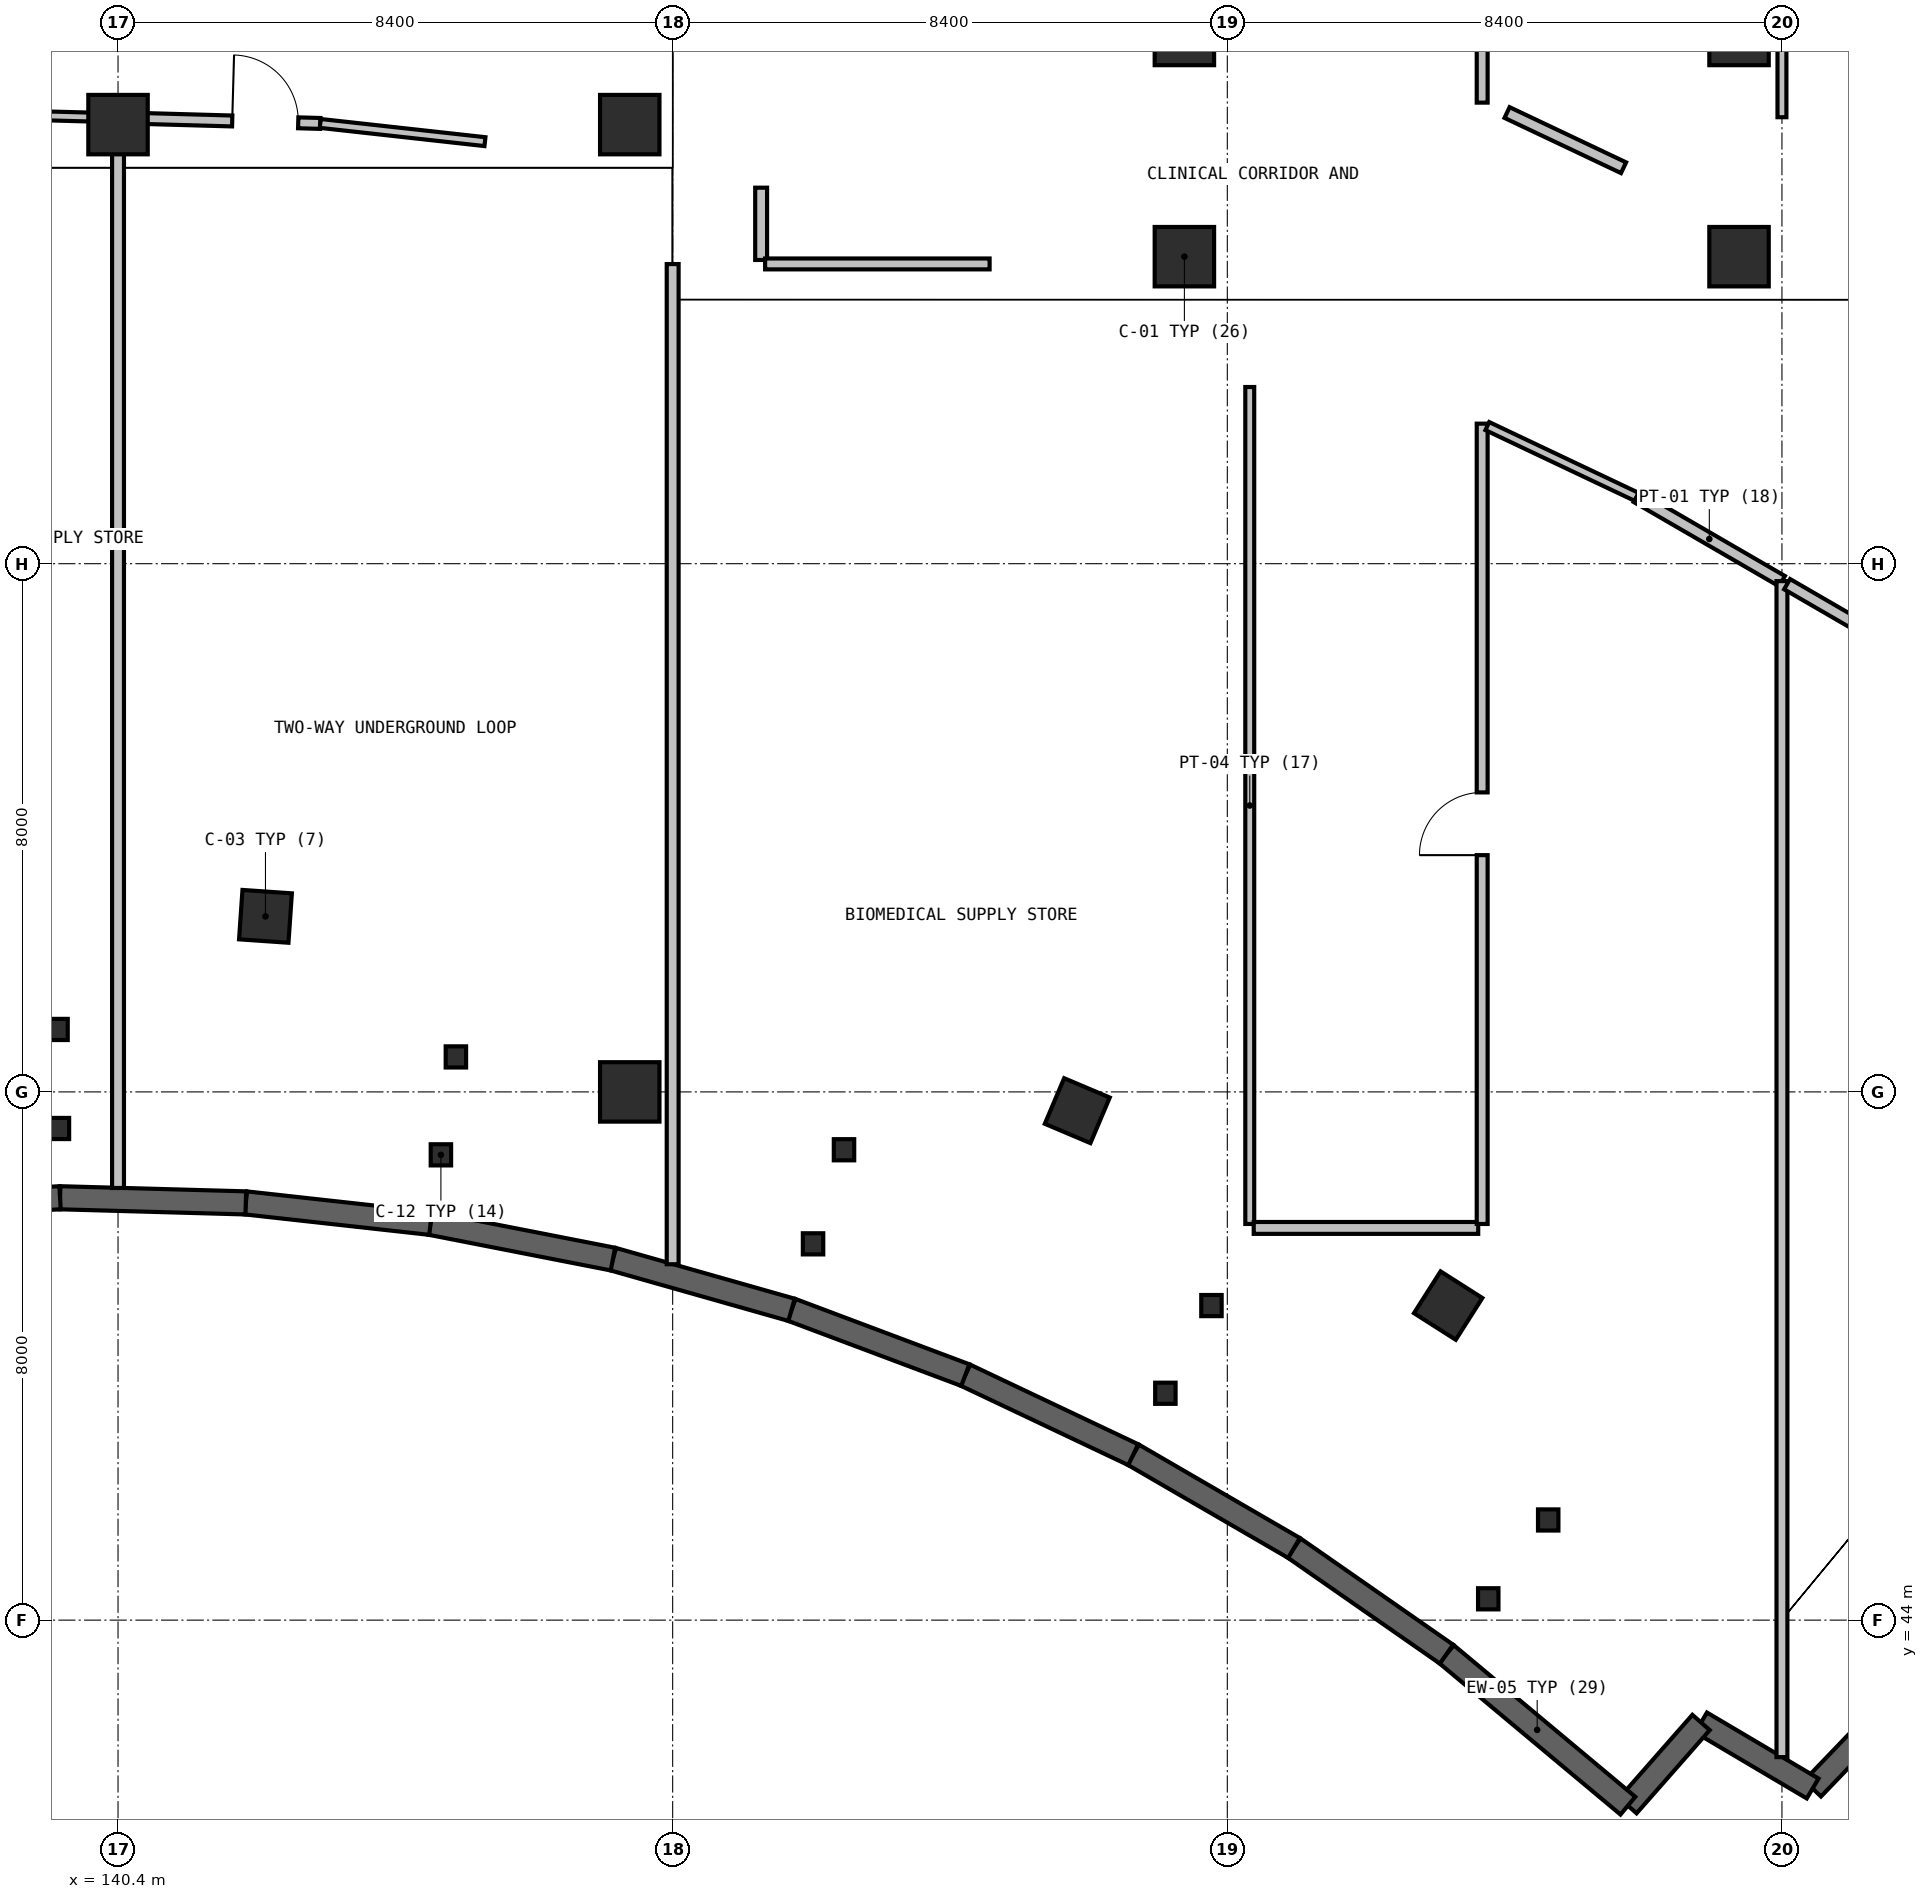
"""IFC4 building model, lengths in metres.
Left out: names, types, materials, properties, quantities, classifications, styles, units other than length and angle.
Written with IfcOpenShell. Run it as: python <this file> out.ifc"""

import sys

from ifc_helpers import new_model, si_unit, direction, frame, frame_2d, origin, origin_2d, place, context, subcontext, project, spatial, rectangle, i_section, extrude, element, fill, save


model = new_model("IFC4")
c1 = context("Model", 3, precision=1e-05, world=origin(), true_north=direction((0.0, 1.0)))
c2 = subcontext(c1, "Body", "Model", "MODEL_VIEW")
j1 = project(units=[si_unit("LENGTHUNIT", "METRE"), si_unit("PLANEANGLEUNIT", "RADIAN")], contexts=[c1])
p1 = place(None, origin())
s1 = spatial("IfcSite", under=j1, at=p1, CompositionType="ELEMENT")
p2 = place(p1, origin())
s2 = spatial("IfcBuilding", under=s1, at=p2, CompositionType="ELEMENT")
p3 = place(p2, frame((0.0, 0.0, -4.8)))
s3 = spatial("IfcBuildingStorey", under=s2, at=p3, CompositionType="ELEMENT", Elevation=-4.8)
for number, where, z_axis, x_axis in (
    (1, (139.484, 52.946, 0.0), (0.0, 0.0, 1.0), (1.0, 0.0, 0.0)),
    (2, (139.505, 51.446, 0.0), (0.0, 0.0, 1.0), (1.0, 0.0, 0.0)),
    (3, (145.517, 52.53, 0.0), (0.0, 0.0, 1.0), (1.0, 0.0, 0.0)),
    (4, (145.29, 51.047, 0.0), (0.0, 0.0, 1.0), (1.0, 0.0, 0.0)),
    (5, (151.395, 51.124, 0.0), (0.0, 0.0, 1.0), (1.0, 0.0, 0.0)),
    (6, (150.926, 49.699, 0.0), (0.0, 0.0, 1.0), (1.0, 0.0, 0.0)),
    (7, (156.96, 48.764, 0.0), (0.0, 0.0, 1.0), (1.0, 0.0, 0.0)),
    (8, (156.262, 47.436, 0.0), (0.0, 0.0, 1.0), (1.0, 0.0, 0.0)),
    (9, (162.06, 45.517, 0.0), (0.0, 0.0, 1.0), (1.0, 0.0, 0.0)),
    (10, (161.152, 44.323, 0.0), (0.0, 0.0, 1.0), (1.0, 0.0, 0.0)),
):
    element("IfcColumn", number, at=place(p3, frame(where, z_axis=z_axis, x_axis=x_axis)), inside=s3, PredefinedType="COLUMN", context=c2, shape_type="SweptSolid", body=[
        extrude(i_section(OverallWidth=0.309, OverallDepth=0.321, WebThickness=0.014, FlangeThickness=0.022, at=origin_2d()), origin(), (0.0, 0.0, 1.0), 4.8),
    ])
p4 = place(p3, frame((140.4, 66.65, 0.0), z_axis=(0.0, 0.0, 1.0), x_axis=(1.0, 0.0, 0.0)))
e11 = element("IfcColumn", 11, at=p4, inside=s3, PredefinedType="COLUMN", context=c2, shape_type="SweptSolid", body=[
    extrude(rectangle(XDim=0.9, YDim=0.9, at=origin_2d()), origin(), (0.0, 0.0, 1.0), 4.8),
])
p5 = place(p3, frame((148.15, 52.0, 0.0), z_axis=(0.0, 0.0, 1.0), x_axis=(1.0, 0.0, 0.0)))
e12 = element("IfcColumn", 12, at=p5, inside=s3, PredefinedType="COLUMN", context=c2, shape_type="SweptSolid", body=[
    extrude(rectangle(XDim=0.9, YDim=0.9, at=origin_2d()), origin(), (0.0, 0.0, 1.0), 4.565),
])
for number, where, z_axis, x_axis in (
    (13, (148.15, 66.65, 0.0), (0.0, 0.0, 1.0), (1.0, 0.0, 0.0)),
    (14, (156.55, 64.65, 0.0), (0.0, 0.0, 1.0), (1.0, 0.0, 0.0)),
    (15, (156.55, 68.0, 0.0), (0.0, 0.0, 1.0), (1.0, 0.0, 0.0)),
    (16, (164.95, 64.65, 0.0), (0.0, 0.0, 1.0), (1.0, 0.0, 0.0)),
    (17, (164.95, 68.0, 0.0), (0.0, 0.0, 1.0), (1.0, 0.0, 0.0)),
):
    element("IfcColumn", number, at=place(p3, frame(where, z_axis=z_axis, x_axis=x_axis)), inside=s3, PredefinedType="COLUMN", context=c2, shape_type="SweptSolid", body=[
        extrude(rectangle(XDim=0.9, YDim=0.9, at=origin_2d()), origin(), (0.0, 0.0, 1.0), 4.8),
    ])
for number, where, z_axis, x_axis in (
    (18, (142.633, 54.659, 0.0), (0.0, 0.0, 1.0), (0.069, 0.998, 0.0)),
    (19, (154.928, 51.716, 0.0), (0.0, 0.0, 1.0), (0.39, 0.921, 0.0)),
    (20, (160.545, 48.764, 0.0), (0.0, 0.0, 1.0), (0.537, 0.844, 0.0)),
):
    element("IfcColumn", number, at=place(p3, frame(where, z_axis=z_axis, x_axis=x_axis)), inside=s3, PredefinedType="COLUMN", context=c2, shape_type="SweptSolid", body=[
        extrude(rectangle(XDim=0.75, YDim=0.75, at=origin_2d()), origin(), (0.0, 0.0, 1.0), 4.8),
    ])
p6 = place(p3, frame((168.79, 44.285, 0.0), z_axis=(0.0, 0.0, 1.0), x_axis=(-0.692999521626, -0.72093804382, 0.0)))
e21 = element("IfcWall", 21, at=p6, inside=s3, PredefinedType="SHEAR", context=c2, shape_type="SweptSolid", body=[
    extrude(rectangle(XDim=3.932, YDim=0.35, at=frame_2d((1.966, 0.0))), origin(), (0.0, 0.0, 1.0), 4.45),
])
p7 = place(p3, frame((166.065, 41.45, 0.0), z_axis=(0.0, 0.0, 1.0), x_axis=(-0.860614493438, 0.509257001606, 0.0)))
e22 = element("IfcWall", 22, at=p7, inside=s3, PredefinedType="SHEAR", context=c2, shape_type="SweptSolid", body=[
    extrude(rectangle(XDim=1.964, YDim=0.35, at=frame_2d((0.982, 0.0))), origin(), (0.0, 0.0, 1.0), 4.45),
])
p8 = place(p3, frame((164.375, 42.45, 0.0), z_axis=(0.0, 0.0, 1.0), x_axis=(-0.660326061666, -0.750979022533, 0.0)))
e23 = element("IfcWall", 23, at=p8, inside=s3, PredefinedType="SHEAR", context=c2, shape_type="SweptSolid", body=[
    extrude(rectangle(XDim=1.678, YDim=0.35, at=frame_2d((0.839, 0.0))), origin(), (0.0, 0.0, 1.0), 4.45),
])
p9 = place(p3, frame((163.267, 41.19, 0.0), z_axis=(0.0, 0.0, 1.0), x_axis=(-0.767516584988, 0.641029088083, 0.0)))
e24 = element("IfcWall", 24, at=p9, inside=s3, PredefinedType="SHEAR", context=c2, shape_type="SweptSolid", body=[
    extrude(rectangle(XDim=3.58, YDim=0.35, at=frame_2d((1.79, 0.0))), origin(), (0.0, 0.0, 1.0), 4.45),
])
p10 = place(p3, frame((160.519, 43.485, 0.0), z_axis=(0.0, 0.0, 1.0), x_axis=(-0.820639839103, 0.571445758123, 0.0)))
e25 = element("IfcWall", 25, at=p10, inside=s3, PredefinedType="SHEAR", context=c2, shape_type="SweptSolid", body=[
    extrude(rectangle(XDim=2.814, YDim=0.35, at=frame_2d((1.407, 0.0))), origin(), (0.0, 0.0, 1.0), 4.45),
])
p11 = place(p3, frame((158.21, 45.093, 0.0), z_axis=(0.0, 0.0, 1.0), x_axis=(-0.864915249361, 0.501917932956, 0.0)))
e26 = element("IfcWall", 26, at=p11, inside=s3, PredefinedType="SHEAR", context=c2, shape_type="SweptSolid", body=[
    extrude(rectangle(XDim=2.815, YDim=0.35, at=frame_2d((1.408, 0.0))), origin(), (0.0, 0.0, 1.0), 4.45),
])
p12 = place(p3, frame((155.775, 46.506, 0.0), z_axis=(0.0, 0.0, 1.0), x_axis=(-0.903700736415, 0.428164663422, 0.0)))
e27 = element("IfcWall", 27, at=p12, inside=s3, PredefinedType="SHEAR", context=c2, shape_type="SweptSolid", body=[
    extrude(rectangle(XDim=2.814, YDim=0.35, at=frame_2d((1.407, 0.0))), origin(), (0.0, 0.0, 1.0), 4.45),
])
p13 = place(p3, frame((153.232, 47.711, 0.0), z_axis=(0.0, 0.0, 1.0), x_axis=(-0.936086290475, 0.351770460363, 0.0)))
e28 = element("IfcWall", 28, at=p13, inside=s3, PredefinedType="SHEAR", context=c2, shape_type="SweptSolid", body=[
    extrude(rectangle(XDim=2.812, YDim=0.35, at=frame_2d((1.406, 0.0))), origin(), (0.0, 0.0, 1.0), 4.45),
])
p14 = place(p3, frame((150.6, 48.7, 0.0), z_axis=(0.0, 0.0, 1.0), x_axis=(-0.961974769047, 0.273138323414, 0.0)))
e29 = element("IfcWall", 29, at=p14, inside=s3, PredefinedType="SHEAR", context=c2, shape_type="SweptSolid", body=[
    extrude(rectangle(XDim=2.812, YDim=0.35, at=frame_2d((1.406, 0.0))), origin(), (0.0, 0.0, 1.0), 4.45),
])
p15 = place(p3, frame((147.895, 49.468, 0.0), z_axis=(0.0, 0.0, 1.0), x_axis=(-0.981350344174, 0.192227734703, 0.0)))
e30 = element("IfcWall", 30, at=p15, inside=s3, PredefinedType="SHEAR", context=c2, shape_type="SweptSolid", body=[
    extrude(rectangle(XDim=2.814, YDim=0.35, at=frame_2d((1.407, 0.0))), origin(), (0.0, 0.0, 1.0), 4.45),
])
p16 = place(p3, frame((145.133, 50.009, 0.0), z_axis=(0.0, 0.0, 1.0), x_axis=(-0.993916475876, 0.110136456187, 0.0)))
e31 = element("IfcWall", 31, at=p16, inside=s3, PredefinedType="SHEAR", context=c2, shape_type="SweptSolid", body=[
    extrude(rectangle(XDim=2.815, YDim=0.35, at=frame_2d((1.408, 0.0))), origin(), (0.0, 0.0, 1.0), 4.45),
])
p17 = place(p3, frame((142.335, 50.319, 0.0), z_axis=(0.0, 0.0, 1.0), x_axis=(-0.999616958311, 0.027675560641, 0.0)))
e32 = element("IfcWall", 32, at=p17, inside=s3, PredefinedType="SHEAR", context=c2, shape_type="SweptSolid", body=[
    extrude(rectangle(XDim=2.814, YDim=0.35, at=frame_2d((1.407, 0.0))), origin(), (0.0, 0.0, 1.0), 4.45),
])
p18 = place(p3, frame((139.522, 50.397, 0.0), z_axis=(0.0, 0.0, 1.0), x_axis=(-0.998456875026, -0.055532591448, 0.0)))
e33 = element("IfcWall", 33, at=p18, inside=s3, PredefinedType="SHEAR", context=c2, shape_type="SweptSolid", body=[
    extrude(rectangle(XDim=2.809, YDim=0.35, at=frame_2d((1.405, 0.0))), origin(), (0.0, 0.0, 1.0), 4.45),
])
p19 = place(p3, frame((139.29, 66.783, 0.0), z_axis=(0.0, 0.0, 1.0), x_axis=(0.999634166902, -0.027046854934, 0.0)))
e34 = element("IfcWall", 34, at=p19, inside=s3, PredefinedType="PARTITIONING", context=c2, shape_type="SweptSolid", body=[
    extrude(rectangle(XDim=1.11, YDim=0.135, at=frame_2d((0.555, 0.0))), origin(), (0.0, 0.0, 1.0), 3.6),
])
p20 = place(p3, frame((140.4, 66.753, 0.0), z_axis=(0.0, 0.0, 1.0), x_axis=(0.0, -1.0, 0.0)))
e35 = element("IfcWall", 35, at=p20, inside=s3, PredefinedType="PARTITIONING", context=c2, shape_type="SweptSolid", body=[
    extrude(rectangle(XDim=16.208, YDim=0.18, at=frame_2d((8.104, 0.0))), origin(), (0.0, 0.0, 1.0), 4.45),
])
p21 = place(p3, frame((140.486, 66.751, 0.0), z_axis=(0.0, 0.0, 1.0), x_axis=(0.999611444096, -0.02787401714, 0.0)))
e36 = element("IfcWall", 36, at=p21, inside=s3, PredefinedType="PARTITIONING", context=c2, shape_type="SweptSolid", body=[
    extrude(rectangle(XDim=2.978, YDim=0.165, at=frame_2d((1.489, 0.0))), origin(), (0.0, 0.0, 1.0), 3.6),
])
p22 = place(p21, frame((1.644, 0.0, 0.0)))
e37 = element("IfcOpeningElement", 37, at=p22, cuts=e36, PredefinedType="OPENING", context=c2, shape_type="SweptSolid", body=[
    extrude(rectangle(XDim=1.0, YDim=2.15, at=frame_2d((0.5, 1.075))), frame((0.0, 0.093, 0.0), z_axis=(0.0, -1.0, 0.0), x_axis=(1.0, 0.0, 0.0)), (0.0, 0.0, 1.0), 0.185),
])
p23 = place(p3, frame((143.463, 66.668, 0.0), z_axis=(0.0, 0.0, 1.0), x_axis=(0.993938191899, -0.109940305095, 0.0)))
e38 = element("IfcWall", 38, at=p23, inside=s3, PredefinedType="PARTITIONING", context=c2, shape_type="SweptSolid", body=[
    extrude(rectangle(XDim=2.509, YDim=0.135, at=frame_2d((1.255, 0.0))), origin(), (0.0, 0.0, 1.0), 3.6),
])
p24 = place(p3, frame((148.8, 64.538, 0.0), z_axis=(0.0, 0.0, 1.0), x_axis=(0.0, -1.0, 0.0)))
e39 = element("IfcWall", 39, at=p24, inside=s3, PredefinedType="PARTITIONING", context=c2, shape_type="SweptSolid", body=[
    extrude(rectangle(XDim=15.148, YDim=0.18, at=frame_2d((7.574, 0.0))), origin(), (0.0, 0.0, 1.0), 4.45),
])
p25 = place(p3, frame((150.14, 65.695, 0.0), z_axis=(0.0, 0.0, 1.0), x_axis=(0.0, -1.0, 0.0)))
e40 = element("IfcWall", 40, at=p25, inside=s3, PredefinedType="PARTITIONING", context=c2, shape_type="SweptSolid", body=[
    extrude(rectangle(XDim=1.095, YDim=0.18, at=frame_2d((0.547, 0.0))), origin(), (0.0, 0.0, 1.0), 4.45),
])
p26 = place(p3, frame((150.2, 64.54, 0.0), z_axis=(0.0, 0.0, 1.0), x_axis=(1.0, 0.0, 0.0)))
e41 = element("IfcWall", 41, at=p26, inside=s3, PredefinedType="PARTITIONING", context=c2, shape_type="SweptSolid", body=[
    extrude(rectangle(XDim=3.4, YDim=0.165, at=frame_2d((1.7, 0.0))), origin(), (0.0, 0.0, 1.0), 4.45),
])
p27 = place(p3, frame((157.54, 62.676, 0.0), z_axis=(0.0, 0.0, 1.0), x_axis=(0.0, -1.0, 0.0)))
e42 = element("IfcWall", 42, at=p27, inside=s3, PredefinedType="PARTITIONING", context=c2, shape_type="SweptSolid", body=[
    extrude(rectangle(XDim=12.676, YDim=0.135, at=frame_2d((6.338, 0.0))), origin(), (0.0, 0.0, 1.0), 4.45),
])
p28 = place(p3, frame((157.6, 49.94, 0.0), z_axis=(0.0, 0.0, 1.0), x_axis=(1.0, 0.0, 0.0)))
e43 = element("IfcWall", 43, at=p28, inside=s3, PredefinedType="PARTITIONING", context=c2, shape_type="SweptSolid", body=[
    extrude(rectangle(XDim=3.4, YDim=0.18, at=frame_2d((1.7, 0.0))), origin(), (0.0, 0.0, 1.0), 4.45),
])
p29 = place(p3, frame((161.06, 50.0, 0.0), z_axis=(0.0, 0.0, 1.0), x_axis=(0.0, 1.0, 0.0)))
e44 = element("IfcWall", 44, at=p29, inside=s3, PredefinedType="PARTITIONING", context=c2, shape_type="SweptSolid", body=[
    extrude(rectangle(XDim=12.121, YDim=0.165, at=frame_2d((6.061, 0.0))), origin(), (0.0, 0.0, 1.0), 4.45),
])
p30 = place(p29, frame((5.586, 0.0, 0.0)))
e45 = element("IfcOpeningElement", 45, at=p30, cuts=e44, PredefinedType="OPENING", context=c2, shape_type="SweptSolid", body=[
    extrude(rectangle(XDim=0.95, YDim=2.1, at=frame_2d((0.475, 1.05))), frame((0.0, 0.093, 0.0), z_axis=(0.0, -1.0, 0.0), x_axis=(1.0, 0.0, 0.0)), (0.0, 0.0, 1.0), 0.185),
])
p31 = place(p3, frame((161.138, 62.084, 0.0), z_axis=(0.0, 0.0, 1.0), x_axis=(0.903650436863, -0.42827081147, 0.0)))
e46 = element("IfcWall", 46, at=p31, inside=s3, PredefinedType="PARTITIONING", context=c2, shape_type="SweptSolid", body=[
    extrude(rectangle(XDim=2.503, YDim=0.135, at=frame_2d((1.251, 0.0))), origin(), (0.0, 0.0, 1.0), 4.45),
])
p32 = place(p3, frame((163.4, 61.012, 0.0), z_axis=(0.0, 0.0, 1.0), x_axis=(0.865071180383, -0.501649133231, 0.0)))
e47 = element("IfcWall", 47, at=p32, inside=s3, PredefinedType="PARTITIONING", context=c2, shape_type="SweptSolid", body=[
    extrude(rectangle(XDim=2.543, YDim=0.18, at=frame_2d((1.272, 0.0))), origin(), (0.0, 0.0, 1.0), 4.45),
])
p33 = place(p3, frame((165.6, 59.736, 0.0), z_axis=(0.0, 0.0, 1.0), x_axis=(0.0, -1.0, 0.0)))
e48 = element("IfcWall", 48, at=p33, inside=s3, PredefinedType="PARTITIONING", context=c2, shape_type="SweptSolid", body=[
    extrude(rectangle(XDim=17.811, YDim=0.165, at=frame_2d((8.906, 0.0))), origin(), (0.0, 0.0, 1.0), 4.45),
])
p34 = place(p3, frame((163.201, 65.997, 0.0), z_axis=(0.0, 0.0, 1.0), x_axis=(-0.903658874167, 0.428253008325, 0.0)))
e49 = element("IfcWall", 49, at=p34, inside=s3, PredefinedType="PARTITIONING", context=c2, shape_type="SweptSolid", body=[
    extrude(rectangle(XDim=1.952, YDim=0.18, at=frame_2d((0.976, 0.0))), origin(), (0.0, 0.0, 1.0), 4.45),
])
p35 = place(p3, frame((161.06, 66.983, 0.0), z_axis=(0.0, 0.0, 1.0), x_axis=(0.0, 1.0, 0.0)))
e50 = element("IfcWall", 50, at=p35, inside=s3, PredefinedType="PARTITIONING", context=c2, shape_type="SweptSolid", body=[
    extrude(rectangle(XDim=9.62, YDim=0.165, at=frame_2d((4.81, 0.0))), origin(), (0.0, 0.0, 1.0), 4.45),
])
p36 = place(p35, frame((4.21, 0.0, 0.0)))
e51 = element("IfcOpeningElement", 51, at=p36, cuts=e50, PredefinedType="OPENING", context=c2, shape_type="SweptSolid", body=[
    extrude(rectangle(XDim=1.2, YDim=2.15, at=frame_2d((0.6, 1.075))), frame((0.0, 0.093, 0.0), z_axis=(0.0, -1.0, 0.0), x_axis=(1.0, 0.0, 0.0)), (0.0, 0.0, 1.0), 0.185),
])
p37 = place(p3, frame((165.6, 77.529, 0.0), z_axis=(0.0, 0.0, 1.0), x_axis=(0.0, -1.0, 0.0)))
e52 = element("IfcWall", 52, at=p37, inside=s3, PredefinedType="PARTITIONING", context=c2, shape_type="SweptSolid", body=[
    extrude(rectangle(XDim=10.767, YDim=0.135, at=frame_2d((5.384, 0.0))), origin(), (0.0, 0.0, 1.0), 4.45),
])
p38 = place(p3, frame((165.678, 59.69, 0.0), z_axis=(0.0, 0.0, 1.0), x_axis=(0.865201820635, -0.501423782413, 0.0)))
e53 = element("IfcWall", 53, at=p38, inside=s3, PredefinedType="PARTITIONING", context=c2, shape_type="SweptSolid", body=[
    extrude(rectangle(XDim=1.54, YDim=0.18, at=frame_2d((0.77, 0.0))), origin(), (0.0, 0.0, 1.0), 4.45),
])
p39 = place(p22, origin())
e54 = element("IfcDoor", 54, at=p39, inside=s3, OperationType="SINGLE_SWING_RIGHT", PredefinedType="DOOR", context=c2, shape_type="SweptSolid", body=[
    extrude(rectangle(XDim=1.0, YDim=2.15, at=frame_2d((0.5, 1.075))), frame((0.0, 0.025, 0.0), z_axis=(0.0, -1.0, 0.0), x_axis=(1.0, 0.0, 0.0)), (0.0, 0.0, 1.0), 0.05),
])
fill(e37, e54)
p40 = place(p30, origin())
e55 = element("IfcDoor", 55, at=p40, inside=s3, OperationType="SINGLE_SWING_RIGHT", PredefinedType="DOOR", context=c2, shape_type="SweptSolid", body=[
    extrude(rectangle(XDim=0.95, YDim=2.1, at=frame_2d((0.475, 1.05))), frame((0.0, 0.025, 0.0), z_axis=(0.0, -1.0, 0.0), x_axis=(1.0, 0.0, 0.0)), (0.0, 0.0, 1.0), 0.05),
])
fill(e45, e55)
save(model, sys.argv[1])
